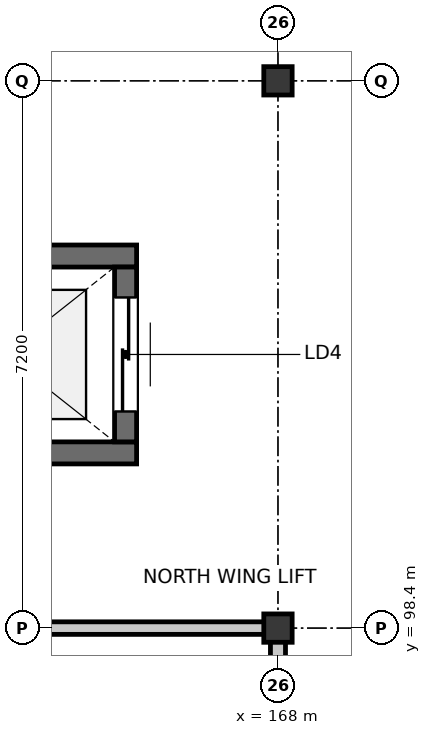
"""IFC4 building model, lengths in metres.
Left out: names, types, materials, properties, quantities, classifications, styles, units other than length and angle.
Written with IfcOpenShell. Run it as: python <this file> out.ifc"""

import sys

from ifc_helpers import new_model, si_unit, direction, frame, frame_2d, origin, origin_2d, place, context, subcontext, project, spatial, rectangle, i_section, extrude, element, fill, save


model = new_model("IFC4")
c1 = context("Model", 3, precision=1e-05, world=origin(), true_north=direction((0.0, 1.0)))
c2 = subcontext(c1, "Body", "Model", "MODEL_VIEW")
j1 = project(units=[si_unit("LENGTHUNIT", "METRE"), si_unit("PLANEANGLEUNIT", "RADIAN")], contexts=[c1])
p1 = place(None, origin())
s1 = spatial("IfcSite", under=j1, at=p1, CompositionType="ELEMENT")
p2 = place(p1, origin())
s2 = spatial("IfcBuilding", under=s1, at=p2, CompositionType="ELEMENT")
p3 = place(p2, frame((0.0, 0.0, 5.4)))
s3 = spatial("IfcBuildingStorey", under=s2, at=p3, CompositionType="ELEMENT", Elevation=5.4)
for number, where, z_axis, x_axis in (
    (1, (168.0, 98.4, 0.0), (0.0, 0.0, 1.0), (1.0, 0.0, 0.0)),
    (2, (168.0, 105.6, 0.0), (0.0, 0.0, 1.0), (1.0, 0.0, 0.0)),
):
    element("IfcColumn", number, at=place(p3, frame(where, z_axis=z_axis, x_axis=x_axis)), inside=s3, PredefinedType="COLUMN", context=c2, shape_type="SweptSolid", body=[
        extrude(i_section(OverallWidth=0.373, OverallDepth=0.373, WebThickness=0.016, FlangeThickness=0.026, FilletRadius=0.015, at=origin_2d()), origin(), (0.0, 0.0, 1.0), 3.9),
    ])
for number, where, z_axis, x_axis in (
    (3, (166.14, 100.705, 0.0), (0.0, 0.0, 1.0), (-1.0, 0.0, 0.0)),
    (4, (162.66, 103.295, 0.0), (0.0, 0.0, 1.0), (1.0, 0.0, 0.0)),
):
    element("IfcWall", number, at=place(p3, frame(where, z_axis=z_axis, x_axis=x_axis)), inside=s3, PredefinedType="SHEAR", context=c2, shape_type="SweptSolid", body=[
        extrude(rectangle(XDim=3.48, YDim=0.29, at=frame_2d((1.74, 0.0))), origin(), (0.0, 0.0, 1.0), 3.67),
    ])
p4 = place(p3, frame((165.995, 103.15, 0.0), z_axis=(0.0, 0.0, 1.0), x_axis=(0.0, -1.0, 0.0)))
e5 = element("IfcWall", 5, at=p4, inside=s3, PredefinedType="SHEAR", context=c2, shape_type="SweptSolid", body=[
    extrude(rectangle(XDim=2.3, YDim=0.29, at=frame_2d((1.15, 0.0))), origin(), (0.0, 0.0, 1.0), 3.67),
])
p5 = place(p4, frame((0.4, 0.0, 0.0)))
e6 = element("IfcOpeningElement", 6, at=p5, cuts=e5, PredefinedType="OPENING", context=c2, shape_type="SweptSolid", body=[
    extrude(rectangle(XDim=1.5, YDim=2.3, at=frame_2d((0.75, 1.15))), frame((0.0, 0.155, 0.0), z_axis=(0.0, -1.0, 0.0), x_axis=(1.0, 0.0, 0.0)), (0.0, 0.0, 1.0), 0.31),
])
p6 = place(p3, frame((153.732, 98.4, 0.0), z_axis=(0.0, 0.0, 1.0), x_axis=(1.0, 0.0, 0.0)))
e7 = element("IfcWall", 7, at=p6, inside=s3, PredefinedType="PARTITIONING", context=c2, shape_type="SweptSolid", body=[
    extrude(rectangle(XDim=14.348, YDim=0.165, at=frame_2d((7.174, 0.0))), origin(), (0.0, 0.0, 1.0), 3.038),
])
p7 = place(p3, frame((168.0, 98.316, 0.0), z_axis=(0.0, 0.0, 1.0), x_axis=(0.0, -1.0, 0.0)))
e8 = element("IfcWall", 8, at=p7, inside=s3, PredefinedType="PARTITIONING", context=c2, shape_type="SweptSolid", body=[
    extrude(rectangle(XDim=21.434, YDim=0.198, at=frame_2d((10.717, 0.0))), origin(), (0.0, 0.0, 1.0), 3.038),
])
p8 = place(p7, frame((10.142, 0.0, 0.0)))
e9 = element("IfcOpeningElement", 9, at=p8, cuts=e8, PredefinedType="OPENING", context=c2, shape_type="SweptSolid", body=[
    extrude(rectangle(XDim=1.15, YDim=2.34, at=frame_2d((0.575, 1.17))), frame((0.0, 0.109, 0.0), z_axis=(0.0, -1.0, 0.0), x_axis=(1.0, 0.0, 0.0)), (0.0, 0.0, 1.0), 0.218),
])
p9 = place(p5, origin())
e10 = element("IfcDoor", 10, at=p9, inside=s3, OperationType="DOUBLE_DOOR_SLIDING", PredefinedType="DOOR", context=c2, shape_type="SweptSolid", body=[
    extrude(rectangle(XDim=1.5, YDim=2.3, at=frame_2d((0.75, 1.15))), frame((0.0, 0.025, 0.0), z_axis=(0.0, -1.0, 0.0), x_axis=(1.0, 0.0, 0.0)), (0.0, 0.0, 1.0), 0.05),
])
fill(e6, e10)
save(model, sys.argv[1])
